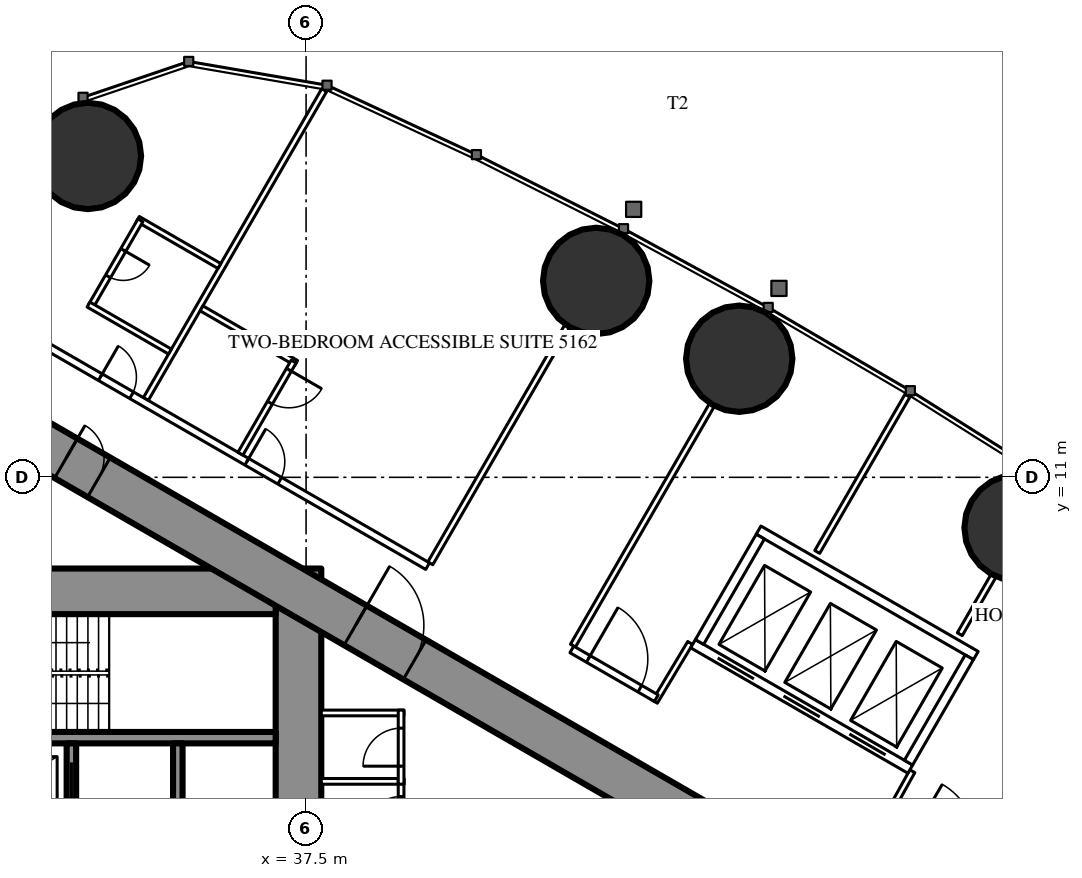
"""IFC4 building model, lengths in metres.
Left out: names, types, materials, properties, quantities, classifications, styles, units other than length and angle.
Written with IfcOpenShell. Run it as: python <this file> out.ifc"""

import sys

from ifc_helpers import new_model, si_unit, direction, frame, frame_2d, origin, origin_2d, place, context, subcontext, project, spatial, rectangle, circle, extrude, element, fill, save


model = new_model("IFC4")
c1 = context("Model", 3, precision=1e-05, world=origin(), true_north=direction((0.0, 1.0)))
c2 = subcontext(c1, "Body", "Model", "MODEL_VIEW")
j1 = project(units=[si_unit("LENGTHUNIT", "METRE"), si_unit("PLANEANGLEUNIT", "RADIAN")], contexts=[c1])
p1 = place(None, origin())
s1 = spatial("IfcSite", under=j1, at=p1, CompositionType="ELEMENT")
p2 = place(p1, origin())
s2 = spatial("IfcBuilding", under=s1, at=p2, CompositionType="ELEMENT")
p3 = place(p2, frame((0.0, 0.0, 191.3)))
s3 = spatial("IfcBuildingStorey", under=s2, at=p3, CompositionType="ELEMENT", Elevation=191.3)
for number, where, z_axis, x_axis in (
    (1, (31.76, 19.456, 0.0), (0.0, 0.0, 1.0), (1.0, 0.0, 0.0)),
    (2, (56.221, 9.672, 0.0), (0.0, 0.0, 1.0), (1.0, 0.0, 0.0)),
    (3, (48.897, 14.121, 0.0), (0.0, 0.0, 1.0), (1.0, 0.0, 0.0)),
    (4, (45.134, 16.168, 0.0), (0.0, 0.0, 1.0), (1.0, 0.0, 0.0)),
):
    element("IfcColumn", number, at=place(p3, frame(where, z_axis=z_axis, x_axis=x_axis)), inside=s3, PredefinedType="COLUMN", context=c2, shape_type="SweptSolid", body=[
        extrude(circle(Radius=1.4, at=origin_2d()), origin(), (0.0, 0.0, 1.0), 3.5),
    ])
p4 = place(p3, frame((37.3, -8.6, 0.0), z_axis=(0.0, 0.0, 1.0), x_axis=(0.0, 1.0, 0.0)))
e5 = element("IfcWall", 5, at=p4, inside=s3, PredefinedType="SHEAR", context=c2, shape_type="SweptSolid", body=[
    extrude(rectangle(XDim=17.2, YDim=1.2, at=frame_2d((8.6, 0.0))), origin(), (0.0, 0.0, 1.0), 3.5),
])
p5 = place(p4, frame((7.7, 0.0, 0.0)))
e6 = element("IfcOpeningElement", 6, at=p5, cuts=e5, PredefinedType="OPENING", context=c2, shape_type="SweptSolid", body=[
    extrude(rectangle(XDim=1.8, YDim=2.2, at=frame_2d((0.9, 1.1))), frame((0.0, 0.61, 0.0), z_axis=(0.0, -1.0, 0.0), x_axis=(1.0, 0.0, 0.0)), (0.0, 0.0, 1.0), 1.22),
])
p6 = place(p3, frame((28.3, 8.0, 0.0), z_axis=(0.0, 0.0, 1.0), x_axis=(1.0, 0.0, 0.0)))
e7 = element("IfcWall", 7, at=p6, inside=s3, PredefinedType="SHEAR", context=c2, shape_type="SweptSolid", body=[
    extrude(rectangle(XDim=8.4, YDim=1.2, at=frame_2d((4.2, 0.0))), origin(), (0.0, 0.0, 1.0), 3.5),
])
p7 = place(p6, frame((0.25, 0.0, 0.0)))
e8 = element("IfcOpeningElement", 8, at=p7, cuts=e7, PredefinedType="OPENING", context=c2, shape_type="SweptSolid", body=[
    extrude(rectangle(XDim=1.0, YDim=2.2, at=frame_2d((0.5, 1.1))), frame((0.0, 0.61, 0.0), z_axis=(0.0, -1.0, 0.0), x_axis=(1.0, 0.0, 0.0)), (0.0, 0.0, 1.0), 1.22),
])
p8 = place(p3, frame((28.3, 4.15, 0.0), z_axis=(0.0, 0.0, 1.0), x_axis=(1.0, 0.0, 0.0)))
e9 = element("IfcWall", 9, at=p8, inside=s3, PredefinedType="SHEAR", context=c2, shape_type="SweptSolid", body=[
    extrude(rectangle(XDim=8.4, YDim=0.3, at=frame_2d((4.2, 0.0))), origin(), (0.0, 0.0, 1.0), 3.5),
])
p9 = place(p3, frame((31.325, 1.9, 0.0), z_axis=(0.0, 0.0, 1.0), x_axis=(0.0, 1.0, 0.0)))
e10 = element("IfcWall", 10, at=p9, inside=s3, PredefinedType="SHEAR", context=c2, shape_type="SweptSolid", body=[
    extrude(rectangle(XDim=2.1, YDim=0.25, at=frame_2d((1.05, 0.0))), origin(), (0.0, 0.0, 1.0), 3.5),
])
p10 = place(p9, frame((0.5, 0.0, 0.0)))
e11 = element("IfcOpeningElement", 11, at=p10, cuts=e10, PredefinedType="OPENING", context=c2, shape_type="SweptSolid", body=[
    extrude(rectangle(XDim=1.1, YDim=2.2, at=frame_2d((0.55, 1.1))), frame((0.0, 0.135, 0.0), z_axis=(0.0, -1.0, 0.0), x_axis=(1.0, 0.0, 0.0)), (0.0, 0.0, 1.0), 0.27),
])
p11 = place(p3, frame((34.125, 1.65, 0.0), z_axis=(0.0, 0.0, 1.0), x_axis=(0.0, 1.0, 0.0)))
e12 = element("IfcWall", 12, at=p11, inside=s3, PredefinedType="SHEAR", context=c2, shape_type="SweptSolid", body=[
    extrude(rectangle(XDim=2.35, YDim=0.25, at=frame_2d((1.175, 0.0))), origin(), (0.0, 0.0, 1.0), 3.5),
])
p12 = place(p3, frame((27.2, 13.8, 0.0), z_axis=(0.0, 0.0, 1.0), x_axis=(0.866024515034, -0.500001539357, 0.0)))
e13 = element("IfcWall", 13, at=p12, inside=s3, PredefinedType="SHEAR", context=c2, shape_type="SweptSolid", body=[
    extrude(rectangle(XDim=26.907, YDim=1.2, at=frame_2d((13.454, 0.0))), origin(), (0.0, 0.0, 1.0), 3.5),
])
p13 = place(p12, frame((4.6, 0.0, 0.0)))
e14 = element("IfcOpeningElement", 14, at=p13, cuts=e13, PredefinedType="OPENING", context=c2, shape_type="SweptSolid", body=[
    extrude(rectangle(XDim=1.0, YDim=2.2, at=frame_2d((0.5, 1.1))), frame((0.0, 0.61, 0.0), z_axis=(0.0, -1.0, 0.0), x_axis=(1.0, 0.0, 0.0)), (0.0, 0.0, 1.0), 1.22),
])
p14 = place(p12, frame((13.395, 0.0, 0.0)))
e15 = element("IfcOpeningElement", 15, at=p14, cuts=e13, PredefinedType="OPENING", context=c2, shape_type="SweptSolid", body=[
    extrude(rectangle(XDim=1.8, YDim=2.2, at=frame_2d((0.9, 1.1))), frame((0.0, 0.61, 0.0), z_axis=(0.0, -1.0, 0.0), x_axis=(1.0, 0.0, 0.0)), (0.0, 0.0, 1.0), 1.22),
])
p15 = place(p3, frame((33.284, 13.059, 0.0), z_axis=(0.0, 0.0, 1.0), x_axis=(0.499985904184, 0.866033541855, 0.0)))
e16 = element("IfcWall", 16, at=p15, inside=s3, PredefinedType="PARTITIONING", context=c2, shape_type="SweptSolid", body=[
    extrude(rectangle(XDim=9.385, YDim=0.15, at=frame_2d((4.693, 0.0))), origin(), (0.0, 0.0, 1.0), 3.25),
])
p16 = place(p3, frame((40.769, 8.737, 0.0), z_axis=(0.0, 0.0, 1.0), x_axis=(0.500013115284, 0.866017831539, 0.0)))
e17 = element("IfcWall", 17, at=p16, inside=s3, PredefinedType="PARTITIONING", context=c2, shape_type="SweptSolid", body=[
    extrude(rectangle(XDim=7.198, YDim=0.15, at=frame_2d((3.599, 0.0))), origin(), (0.0, 0.0, 1.0), 2.3),
])
p17 = place(p3, frame((44.521, 6.571, 0.0), z_axis=(0.0, 0.0, 1.0), x_axis=(0.500020376429, 0.866013639128, 0.0)))
e18 = element("IfcWall", 18, at=p17, inside=s3, PredefinedType="PARTITIONING", context=c2, shape_type="SweptSolid", body=[
    extrude(rectangle(XDim=7.306, YDim=0.15, at=frame_2d((3.653, 0.0))), origin(), (0.0, 0.0, 1.0), 2.3),
])
p18 = place(p3, frame((50.95, 9.037, 0.0), z_axis=(0.0, 0.0, 1.0), x_axis=(0.499988022762, 0.866032318735, 0.0)))
e19 = element("IfcWall", 19, at=p18, inside=s3, PredefinedType="PARTITIONING", context=c2, shape_type="SweptSolid", body=[
    extrude(rectangle(XDim=4.748, YDim=0.15, at=frame_2d((2.374, 0.0))), origin(), (0.0, 0.0, 1.0), 3.25),
])
p19 = place(p3, frame((54.7, 6.872, 0.0), z_axis=(0.0, 0.0, 1.0), x_axis=(0.499989690894, 0.866031355668, 0.0)))
e20 = element("IfcWall", 20, at=p19, inside=s3, PredefinedType="PARTITIONING", context=c2, shape_type="SweptSolid", body=[
    extrude(rectangle(XDim=1.766, YDim=0.15, at=frame_2d((0.883, 0.0))), origin(), (0.0, 0.0, 1.0), 3.25),
])
for number, where, z_axis, x_axis in (
    (21, (52.576, 1.689, 0.0), (0.0, 0.0, 1.0), (0.485, 0.874, 0.0)),
    (22, (47.606, 6.643, 0.0), (0.0, 0.0, 1.0), (-0.514, -0.858, 0.0)),
):
    element("IfcWall", number, at=place(p3, frame(where, z_axis=z_axis, x_axis=x_axis)), inside=s3, PredefinedType="PARTITIONING", context=c2, shape_type="SweptSolid", body=[
        extrude(rectangle(XDim=1.805, YDim=0.15, at=frame_2d((0.902, 0.0))), origin(), (0.0, 0.0, 1.0), 3.25),
    ])
p20 = place(p3, frame((27.959, 16.017, 0.0), z_axis=(0.0, 0.0, 1.0), x_axis=(0.866024165033, -0.500002145574, 0.0)))
e23 = element("IfcWall", 23, at=p20, inside=s3, PredefinedType="PARTITIONING", context=c2, shape_type="SweptSolid", body=[
    extrude(rectangle(XDim=14.709, YDim=0.2, at=frame_2d((7.354, 0.0))), origin(), (0.0, 0.0, 1.0), 3.25),
])
p21 = place(p20, frame((9.215, 0.0, 0.0)))
e24 = element("IfcOpeningElement", 24, at=p21, cuts=e23, PredefinedType="OPENING", context=c2, shape_type="SweptSolid", body=[
    extrude(rectangle(XDim=1.0, YDim=2.2, at=frame_2d((0.5, 1.1))), frame((0.0, 0.11, 0.0), z_axis=(0.0, -1.0, 0.0), x_axis=(1.0, 0.0, 0.0)), (0.0, 0.0, 1.0), 0.22),
])
p22 = place(p20, frame((4.765, 0.0, 0.0)))
e25 = element("IfcOpeningElement", 25, at=p22, cuts=e23, PredefinedType="OPENING", context=c2, shape_type="SweptSolid", body=[
    extrude(rectangle(XDim=0.95, YDim=2.2, at=frame_2d((0.475, 1.1))), frame((0.0, 0.11, 0.0), z_axis=(0.0, -1.0, 0.0), x_axis=(1.0, 0.0, 0.0)), (0.0, 0.0, 1.0), 0.22),
])
p23 = place(p3, frame((44.493, 6.472, 0.0), z_axis=(0.0, 0.0, 1.0), x_axis=(0.866027140358, -0.499996992154, 0.0)))
e26 = element("IfcWall", 26, at=p23, inside=s3, PredefinedType="PARTITIONING", context=c2, shape_type="SweptSolid", body=[
    extrude(rectangle(XDim=2.566, YDim=0.2, at=frame_2d((1.283, 0.0))), origin(), (0.0, 0.0, 1.0), 3.25),
])
p24 = place(p23, frame((0.5, 0.0, 0.0)))
e27 = element("IfcOpeningElement", 27, at=p24, cuts=e26, PredefinedType="OPENING", context=c2, shape_type="SweptSolid", body=[
    extrude(rectangle(XDim=1.566, YDim=2.2, at=frame_2d((0.783, 1.1))), frame((0.0, 0.11, 0.0), z_axis=(0.0, -1.0, 0.0), x_axis=(1.0, 0.0, 0.0)), (0.0, 0.0, 1.0), 0.22),
])
p25 = place(p3, frame((34.749, 15.446, 0.0), z_axis=(0.0, 0.0, 1.0), x_axis=(0.866018712932, -0.500011588718, 0.0)))
e28 = element("IfcWall", 28, at=p25, inside=s3, PredefinedType="PARTITIONING", context=c2, shape_type="SweptSolid", body=[
    extrude(rectangle(XDim=2.875, YDim=0.15, at=frame_2d((1.438, 0.0))), origin(), (0.0, 0.0, 1.0), 3.25),
])
p26 = place(p3, frame((35.773, 11.621, 0.0), z_axis=(0.0, 0.0, 1.0), x_axis=(0.49998411664, 0.866034573852, 0.0)))
e29 = element("IfcWall", 29, at=p26, inside=s3, PredefinedType="PARTITIONING", context=c2, shape_type="SweptSolid", body=[
    extrude(rectangle(XDim=2.8, YDim=0.15, at=frame_2d((1.4, 0.0))), origin(), (0.0, 0.0, 1.0), 3.25),
])
p27 = place(p26, frame((1.55, 0.0, 0.0)))
e30 = element("IfcOpeningElement", 30, at=p27, cuts=e29, PredefinedType="OPENING", context=c2, shape_type="SweptSolid", body=[
    extrude(rectangle(XDim=1.0, YDim=2.2, at=frame_2d((0.5, 1.1))), frame((0.0, 0.085, 0.0), z_axis=(0.0, -1.0, 0.0), x_axis=(1.0, 0.0, 0.0)), (0.0, 0.0, 1.0), 0.17),
])
p28 = place(p3, frame((33.075, 17.798, 0.0), z_axis=(0.0, 0.0, 1.0), x_axis=(0.866006523861, -0.500032699561, 0.0)))
e31 = element("IfcWall", 31, at=p28, inside=s3, PredefinedType="PARTITIONING", context=c2, shape_type="SweptSolid", body=[
    extrude(rectangle(XDim=2.475, YDim=0.15, at=frame_2d((1.237, 0.0))), origin(), (0.0, 0.0, 1.0), 3.25),
])
p29 = place(p3, frame((31.84, 15.509, 0.0), z_axis=(0.0, 0.0, 1.0), x_axis=(0.500006934395, 0.866021400173, 0.0)))
e32 = element("IfcWall", 32, at=p29, inside=s3, PredefinedType="PARTITIONING", context=c2, shape_type="SweptSolid", body=[
    extrude(rectangle(XDim=2.6, YDim=0.15, at=frame_2d((1.3, 0.0))), origin(), (0.0, 0.0, 1.0), 3.25),
])
p30 = place(p29, frame((0.9, 0.0, 0.0)))
e33 = element("IfcOpeningElement", 33, at=p30, cuts=e32, PredefinedType="OPENING", context=c2, shape_type="SweptSolid", body=[
    extrude(rectangle(XDim=0.8, YDim=2.2, at=frame_2d((0.4, 1.1))), frame((0.0, 0.085, 0.0), z_axis=(0.0, -1.0, 0.0), x_axis=(1.0, 0.0, 0.0)), (0.0, 0.0, 1.0), 0.17),
])
p31 = place(p3, frame((31.775, 15.546, 0.0), z_axis=(0.0, 0.0, 1.0), x_axis=(0.866031185235, -0.4999899861, 0.0)))
e34 = element("IfcWall", 34, at=p31, inside=s3, PredefinedType="PARTITIONING", context=c2, shape_type="SweptSolid", body=[
    extrude(rectangle(XDim=2.475, YDim=0.15, at=frame_2d((1.238, 0.0))), origin(), (0.0, 0.0, 1.0), 3.25),
])
for number, where, z_axis, x_axis in (
    (35, (37.9, 3.0, 0.0), (0.0, 0.0, 1.0), (1.0, 0.0, 0.0)),
    (36, (37.9, 4.8, 0.0), (0.0, 0.0, 1.0), (1.0, 0.0, 0.0)),
):
    element("IfcWall", number, at=place(p3, frame(where, z_axis=z_axis, x_axis=x_axis)), inside=s3, PredefinedType="PARTITIONING", context=c2, shape_type="SweptSolid", body=[
        extrude(rectangle(XDim=2.175, YDim=0.15, at=frame_2d((1.087, 0.0))), origin(), (0.0, 0.0, 1.0), 3.25),
    ])
p32 = place(p3, frame((40.0, 1.125, 0.0), z_axis=(0.0, 0.0, 1.0), x_axis=(0.0, 1.0, 0.0)))
e37 = element("IfcWall", 37, at=p32, inside=s3, PredefinedType="PARTITIONING", context=c2, shape_type="SweptSolid", body=[
    extrude(rectangle(XDim=1.95, YDim=0.15, at=frame_2d((0.975, 0.0))), origin(), (0.0, 0.0, 1.0), 3.25),
])
p33 = place(p32, frame((0.475, 0.0, 0.0)))
e38 = element("IfcOpeningElement", 38, at=p33, cuts=e37, PredefinedType="OPENING", context=c2, shape_type="SweptSolid", body=[
    extrude(rectangle(XDim=1.0, YDim=2.2, at=frame_2d((0.5, 1.1))), frame((0.0, 0.085, 0.0), z_axis=(0.0, -1.0, 0.0), x_axis=(1.0, 0.0, 0.0)), (0.0, 0.0, 1.0), 0.17),
])
p34 = place(p3, frame((40.0, 2.925, 0.0), z_axis=(0.0, 0.0, 1.0), x_axis=(0.0, 1.0, 0.0)))
e39 = element("IfcWall", 39, at=p34, inside=s3, PredefinedType="PARTITIONING", context=c2, shape_type="SweptSolid", body=[
    extrude(rectangle(XDim=1.95, YDim=0.15, at=frame_2d((0.975, 0.0))), origin(), (0.0, 0.0, 1.0), 3.25),
])
p35 = place(p34, frame((0.475, 0.0, 0.0)))
e40 = element("IfcOpeningElement", 40, at=p35, cuts=e39, PredefinedType="OPENING", context=c2, shape_type="SweptSolid", body=[
    extrude(rectangle(XDim=1.0, YDim=2.2, at=frame_2d((0.5, 1.1))), frame((0.0, 0.085, 0.0), z_axis=(0.0, -1.0, 0.0), x_axis=(1.0, 0.0, 0.0)), (0.0, 0.0, 1.0), 0.17),
])
p36 = place(p3, frame((47.681, 6.622, 0.0), z_axis=(0.0, 0.0, 1.0), x_axis=(0.86603344179, -0.499986077507, 0.0)))
e41 = element("IfcWall", 41, at=p36, inside=s3, PredefinedType="PARTITIONING", context=c2, shape_type="SweptSolid", body=[
    extrude(rectangle(XDim=6.6, YDim=0.25, at=frame_2d((3.3, 0.0))), origin(), (0.0, 0.0, 1.0), 3.25),
])
p37 = place(p36, frame((0.75, 0.0, 0.0)))
e42 = element("IfcOpeningElement", 42, at=p37, cuts=e41, PredefinedType="OPENING", context=c2, shape_type="SweptSolid", body=[
    extrude(rectangle(XDim=1.1, YDim=2.2, at=frame_2d((0.55, 1.1))), frame((0.0, 0.135, 0.0), z_axis=(0.0, -1.0, 0.0), x_axis=(1.0, 0.0, 0.0)), (0.0, 0.0, 1.0), 0.27),
])
p38 = place(p36, frame((2.75, 0.0, 0.0)))
e43 = element("IfcOpeningElement", 43, at=p38, cuts=e41, PredefinedType="OPENING", context=c2, shape_type="SweptSolid", body=[
    extrude(rectangle(XDim=1.1, YDim=2.2, at=frame_2d((0.55, 1.1))), frame((0.0, 0.135, 0.0), z_axis=(0.0, -1.0, 0.0), x_axis=(1.0, 0.0, 0.0)), (0.0, 0.0, 1.0), 0.27),
])
p39 = place(p36, frame((4.75, 0.0, 0.0)))
e44 = element("IfcOpeningElement", 44, at=p39, cuts=e41, PredefinedType="OPENING", context=c2, shape_type="SweptSolid", body=[
    extrude(rectangle(XDim=1.1, YDim=2.2, at=frame_2d((0.55, 1.1))), frame((0.0, 0.135, 0.0), z_axis=(0.0, -1.0, 0.0), x_axis=(1.0, 0.0, 0.0)), (0.0, 0.0, 1.0), 0.27),
])
p40 = place(p3, frame((49.406, 9.611, 0.0), z_axis=(0.0, 0.0, 1.0), x_axis=(0.86603344179, -0.499986077507, 0.0)))
e45 = element("IfcWall", 45, at=p40, inside=s3, PredefinedType="PARTITIONING", context=c2, shape_type="SweptSolid", body=[
    extrude(rectangle(XDim=6.6, YDim=0.25, at=frame_2d((3.3, 0.0))), origin(), (0.0, 0.0, 1.0), 3.25),
])
p41 = place(p3, frame((47.852, 6.668, 0.0), z_axis=(0.0, 0.0, 1.0), x_axis=(0.499929347863, 0.866066190972, 0.0)))
e46 = element("IfcWall", 46, at=p41, inside=s3, PredefinedType="PARTITIONING", context=c2, shape_type="SweptSolid", body=[
    extrude(rectangle(XDim=3.201, YDim=0.25, at=frame_2d((1.6, 0.0))), origin(), (0.0, 0.0, 1.0), 3.25),
])
p42 = place(p3, frame((53.352, 3.493, 0.0), z_axis=(0.0, 0.0, 1.0), x_axis=(0.499872130319, 0.866099216793, 0.0)))
e47 = element("IfcWall", 47, at=p42, inside=s3, PredefinedType="PARTITIONING", context=c2, shape_type="SweptSolid", body=[
    extrude(rectangle(XDim=3.2, YDim=0.25, at=frame_2d((1.6, 0.0))), origin(), (0.0, 0.0, 1.0), 3.25),
])
p43 = place(p27, origin())
e48 = element("IfcDoor", 48, at=p43, inside=s3, OperationType="SINGLE_SWING_RIGHT", PredefinedType="DOOR", context=c2, shape_type="SweptSolid", body=[
    extrude(rectangle(XDim=1.0, YDim=2.2, at=frame_2d((0.5, 1.1))), frame((0.0, 0.025, 0.0), z_axis=(0.0, -1.0, 0.0), x_axis=(1.0, 0.0, 0.0)), (0.0, 0.0, 1.0), 0.05),
])
fill(e30, e48)
p44 = place(p21, origin())
e49 = element("IfcDoor", 49, at=p44, inside=s3, OperationType="SINGLE_SWING_LEFT", PredefinedType="DOOR", context=c2, shape_type="SweptSolid", body=[
    extrude(rectangle(XDim=1.0, YDim=2.2, at=frame_2d((0.5, 1.1))), frame((0.0, 0.025, 0.0), z_axis=(0.0, -1.0, 0.0), x_axis=(1.0, 0.0, 0.0)), (0.0, 0.0, 1.0), 0.05),
])
fill(e24, e49)
p45 = place(p30, origin())
e50 = element("IfcDoor", 50, at=p45, inside=s3, OperationType="SINGLE_SWING_RIGHT", PredefinedType="DOOR", context=c2, shape_type="SweptSolid", body=[
    extrude(rectangle(XDim=0.8, YDim=2.2, at=frame_2d((0.4, 1.1))), frame((0.0, 0.025, 0.0), z_axis=(0.0, -1.0, 0.0), x_axis=(1.0, 0.0, 0.0)), (0.0, 0.0, 1.0), 0.05),
])
fill(e33, e50)
p46 = place(p22, origin())
e51 = element("IfcDoor", 51, at=p46, inside=s3, OperationType="SINGLE_SWING_LEFT", PredefinedType="DOOR", context=c2, shape_type="SweptSolid", body=[
    extrude(rectangle(XDim=0.95, YDim=2.2, at=frame_2d((0.475, 1.1))), frame((0.0, 0.025, 0.0), z_axis=(0.0, -1.0, 0.0), x_axis=(1.0, 0.0, 0.0)), (0.0, 0.0, 1.0), 0.05),
])
fill(e25, e51)
p47 = place(p24, origin())
e52 = element("IfcDoor", 52, at=p47, inside=s3, OperationType="SINGLE_SWING_LEFT", PredefinedType="DOOR", context=c2, shape_type="SweptSolid", body=[
    extrude(rectangle(XDim=1.566, YDim=2.2, at=frame_2d((0.783, 1.1))), frame((0.0, 0.025, 0.0), z_axis=(0.0, -1.0, 0.0), x_axis=(1.0, 0.0, 0.0)), (0.0, 0.0, 1.0), 0.05),
])
fill(e27, e52)
p48 = place(p33, origin())
e53 = element("IfcDoor", 53, at=p48, inside=s3, OperationType="SINGLE_SWING_LEFT", PredefinedType="DOOR", context=c2, shape_type="SweptSolid", body=[
    extrude(rectangle(XDim=1.0, YDim=2.2, at=frame_2d((0.5, 1.1))), frame((0.0, 0.025, 0.0), z_axis=(0.0, -1.0, 0.0), x_axis=(1.0, 0.0, 0.0)), (0.0, 0.0, 1.0), 0.05),
])
fill(e38, e53)
p49 = place(p35, origin())
e54 = element("IfcDoor", 54, at=p49, inside=s3, OperationType="SINGLE_SWING_LEFT", PredefinedType="DOOR", context=c2, shape_type="SweptSolid", body=[
    extrude(rectangle(XDim=1.0, YDim=2.2, at=frame_2d((0.5, 1.1))), frame((0.0, 0.025, 0.0), z_axis=(0.0, -1.0, 0.0), x_axis=(1.0, 0.0, 0.0)), (0.0, 0.0, 1.0), 0.05),
])
fill(e40, e54)
p50 = place(p13, origin())
e55 = element("IfcDoor", 55, at=p50, inside=s3, OperationType="SINGLE_SWING_LEFT", PredefinedType="DOOR", context=c2, shape_type="SweptSolid", body=[
    extrude(rectangle(XDim=1.0, YDim=2.2, at=frame_2d((0.5, 1.1))), frame((0.0, 0.025, 0.0), z_axis=(0.0, -1.0, 0.0), x_axis=(1.0, 0.0, 0.0)), (0.0, 0.0, 1.0), 0.05),
])
fill(e14, e55)
p51 = place(p14, origin())
e56 = element("IfcDoor", 56, at=p51, inside=s3, OperationType="DOUBLE_DOOR_SINGLE_SWING", PredefinedType="DOOR", context=c2, shape_type="SweptSolid", body=[
    extrude(rectangle(XDim=1.8, YDim=2.2, at=frame_2d((0.9, 1.1))), frame((0.0, 0.025, 0.0), z_axis=(0.0, -1.0, 0.0), x_axis=(1.0, 0.0, 0.0)), (0.0, 0.0, 1.0), 0.05),
])
fill(e15, e56)
p52 = place(p10, origin())
e57 = element("IfcDoor", 57, at=p52, inside=s3, OperationType="SLIDING_TO_LEFT", PredefinedType="USERDEFINED", context=c2, shape_type="SweptSolid", body=[
    extrude(rectangle(XDim=1.1, YDim=2.2, at=frame_2d((0.55, 1.1))), frame((0.0, 0.025, 0.0), z_axis=(0.0, -1.0, 0.0), x_axis=(1.0, 0.0, 0.0)), (0.0, 0.0, 1.0), 0.05),
])
fill(e11, e57)
p53 = place(p37, origin())
e58 = element("IfcDoor", 58, at=p53, inside=s3, OperationType="DOUBLE_DOOR_SLIDING", PredefinedType="USERDEFINED", context=c2, shape_type="SweptSolid", body=[
    extrude(rectangle(XDim=1.1, YDim=2.2, at=frame_2d((0.55, 1.1))), frame((0.0, 0.025, 0.0), z_axis=(0.0, -1.0, 0.0), x_axis=(1.0, 0.0, 0.0)), (0.0, 0.0, 1.0), 0.05),
])
fill(e42, e58)
p54 = place(p38, origin())
e59 = element("IfcDoor", 59, at=p54, inside=s3, OperationType="DOUBLE_DOOR_SLIDING", PredefinedType="USERDEFINED", context=c2, shape_type="SweptSolid", body=[
    extrude(rectangle(XDim=1.1, YDim=2.2, at=frame_2d((0.55, 1.1))), frame((0.0, 0.025, 0.0), z_axis=(0.0, -1.0, 0.0), x_axis=(1.0, 0.0, 0.0)), (0.0, 0.0, 1.0), 0.05),
])
fill(e43, e59)
p55 = place(p39, origin())
e60 = element("IfcDoor", 60, at=p55, inside=s3, OperationType="DOUBLE_DOOR_SLIDING", PredefinedType="USERDEFINED", context=c2, shape_type="SweptSolid", body=[
    extrude(rectangle(XDim=1.1, YDim=2.2, at=frame_2d((0.55, 1.1))), frame((0.0, 0.025, 0.0), z_axis=(0.0, -1.0, 0.0), x_axis=(1.0, 0.0, 0.0)), (0.0, 0.0, 1.0), 0.05),
])
fill(e44, e60)
save(model, sys.argv[1])
